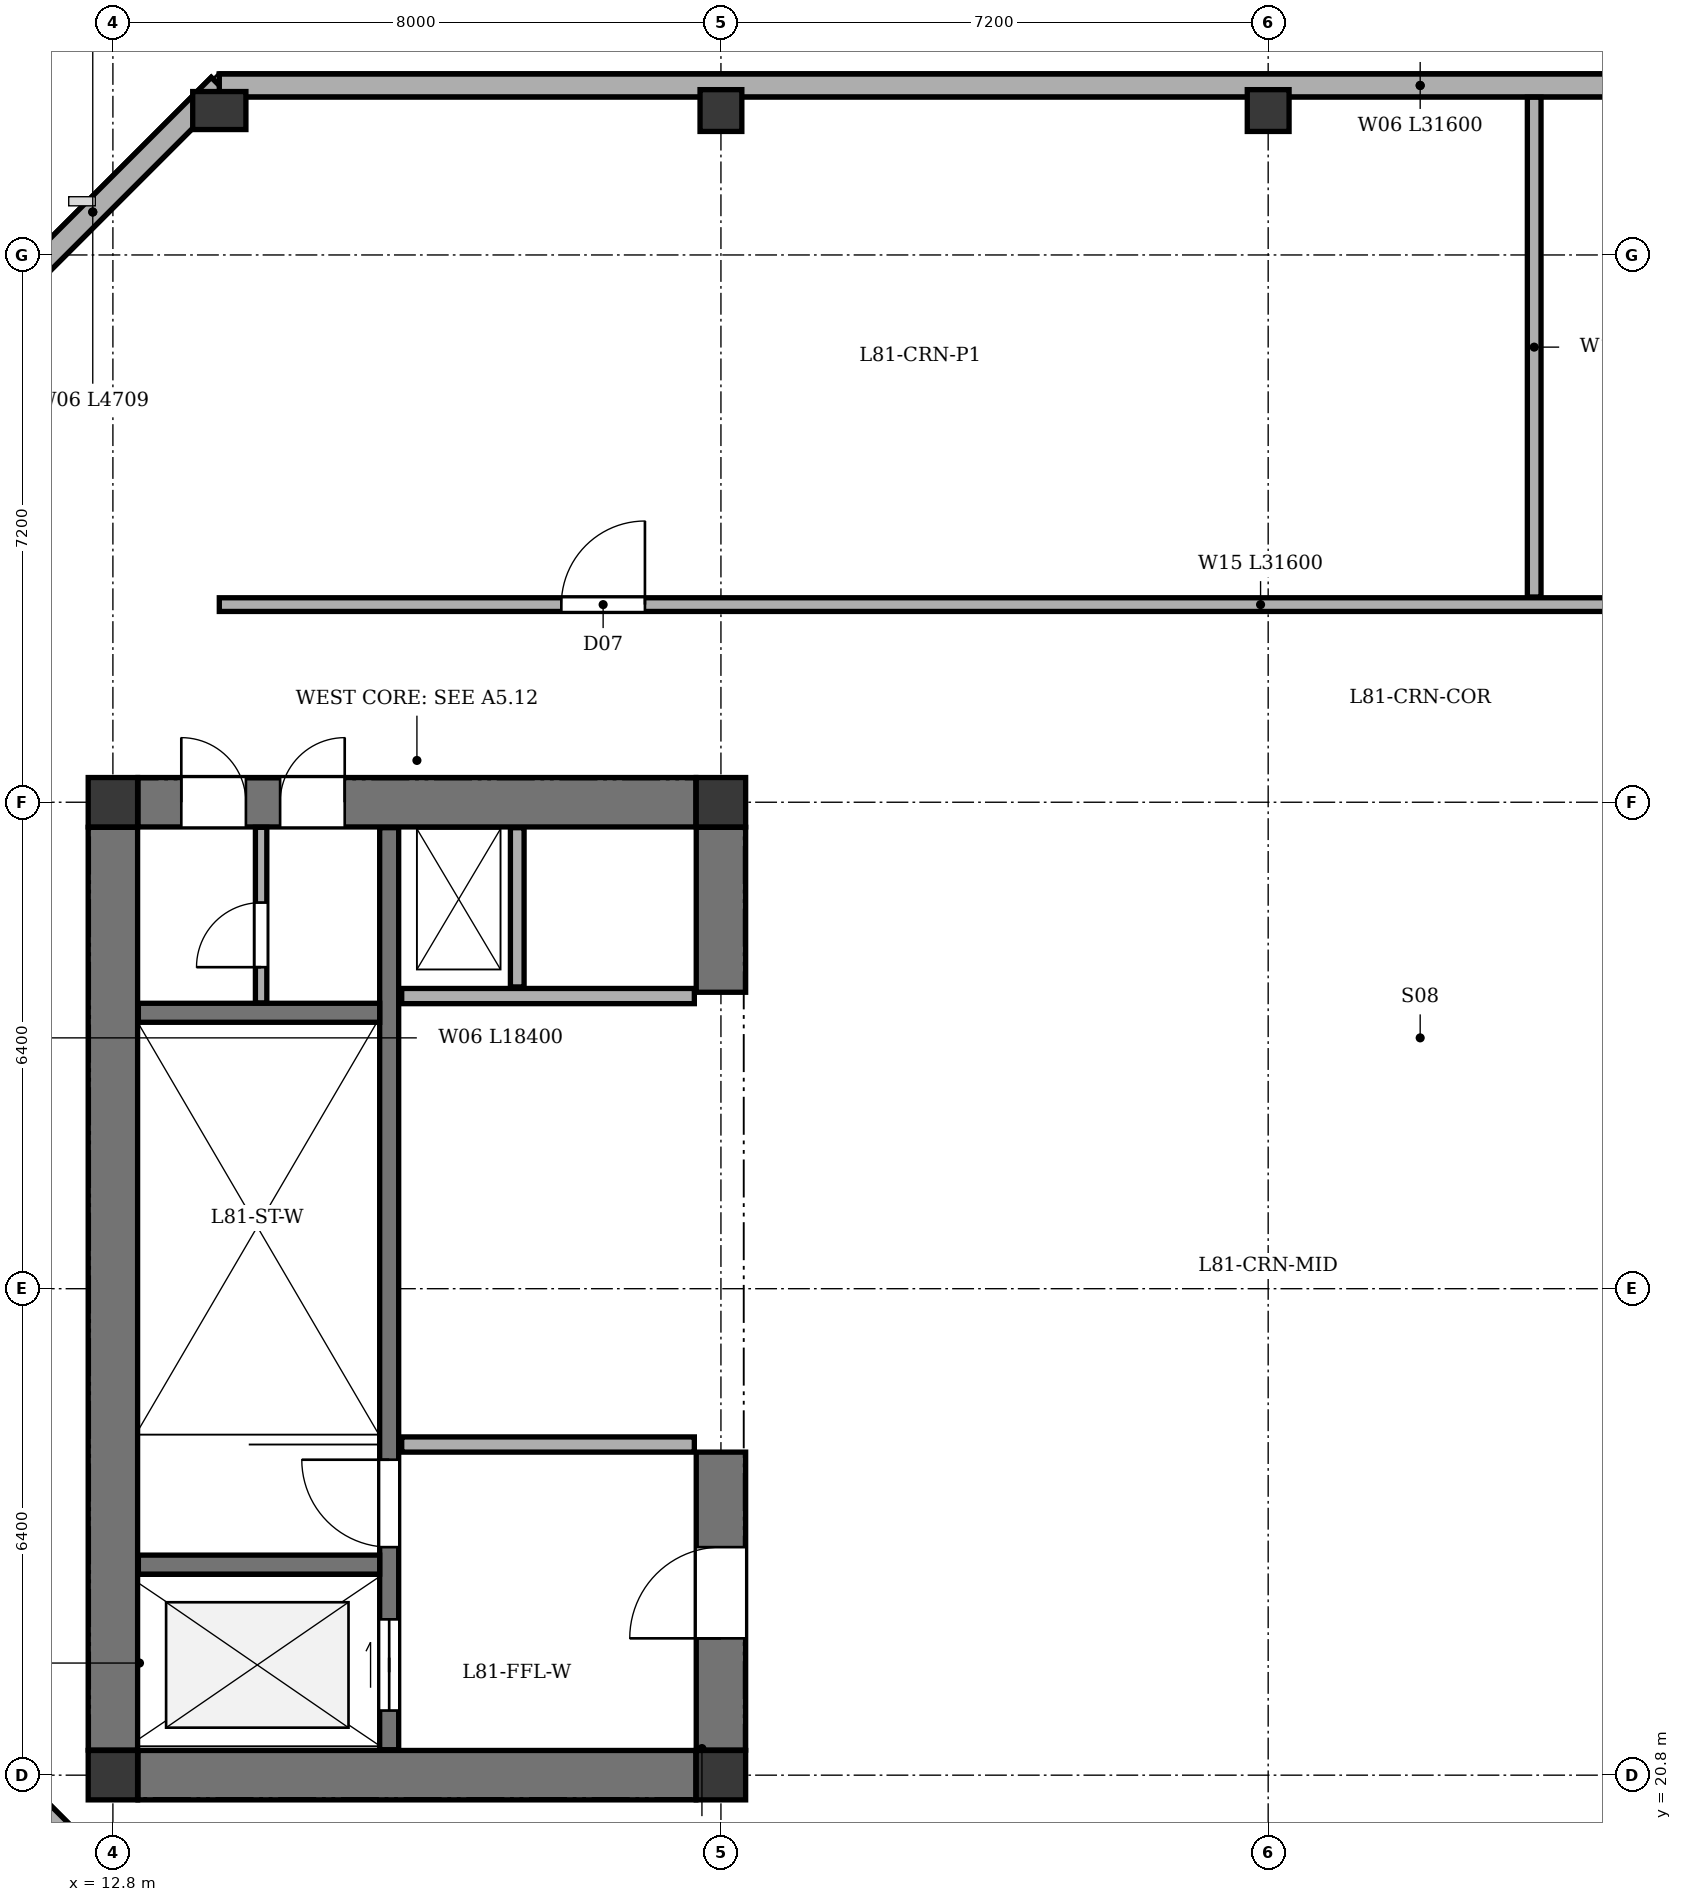
"""IFC4 building model, lengths in metres.
Left out: names, types, materials, properties, quantities, classifications, styles, units other than length and angle.
Written with IfcOpenShell. Run it as: python <this file> out.ifc"""

import sys

from ifc_helpers import new_model, si_unit, direction, frame, frame_2d, origin, origin_2d, place, context, subcontext, project, spatial, polyline, rectangle, outline, extrude, element, fill, save


model = new_model("IFC4")
c1 = context("Model", 3, precision=1e-05, world=origin(), true_north=direction((0.0, 1.0)))
c2 = subcontext(c1, "Body", "Model", "MODEL_VIEW")
j1 = project(units=[si_unit("LENGTHUNIT", "METRE"), si_unit("PLANEANGLEUNIT", "RADIAN")], contexts=[c1])
p1 = place(None, origin())
s1 = spatial("IfcSite", under=j1, at=p1, CompositionType="ELEMENT")
p2 = place(p1, origin())
s2 = spatial("IfcBuilding", under=s1, at=p2, CompositionType="ELEMENT")
p3 = place(p2, frame((0.0, 0.0, 309.0)))
s3 = spatial("IfcBuildingStorey", under=s2, at=p3, CompositionType="ELEMENT", Elevation=309.0)
for number, where, z_axis, x_axis in (
    (1, (12.8, 20.8, 0.0), (0.0, 0.0, 1.0), (1.0, 0.0, 0.0)),
    (2, (20.8, 20.8, 0.0), (0.0, 0.0, 1.0), (1.0, 0.0, 0.0)),
    (3, (12.8, 33.6, 0.0), (0.0, 0.0, 1.0), (1.0, 0.0, 0.0)),
    (4, (20.8, 33.6, 0.0), (0.0, 0.0, 1.0), (1.0, 0.0, 0.0)),
):
    element("IfcColumn", number, at=place(p3, frame(where, z_axis=z_axis, x_axis=x_axis)), inside=s3, PredefinedType="COLUMN", context=c2, shape_type="SweptSolid", body=[
        extrude(rectangle(XDim=0.65, YDim=0.65, at=origin_2d()), origin(), (0.0, 0.0, 1.0), 4.2),
    ])
p4 = place(p3, frame((14.2, 42.7, 0.0), z_axis=(0.0, 0.0, 1.0), x_axis=(1.0, 0.0, 0.0)))
e5 = element("IfcColumn", 5, at=p4, inside=s3, PredefinedType="COLUMN", context=c2, shape_type="SweptSolid", body=[
    extrude(rectangle(XDim=0.5, YDim=0.7, at=origin_2d()), origin(), (0.0, 0.0, 1.0), 4.2),
])
for number, where, z_axis, x_axis in (
    (6, (20.8, 42.7, 0.0), (0.0, 0.0, 1.0), (1.0, 0.0, 0.0)),
    (7, (28.0, 42.7, 0.0), (0.0, 0.0, 1.0), (1.0, 0.0, 0.0)),
):
    element("IfcColumn", number, at=place(p3, frame(where, z_axis=z_axis, x_axis=x_axis)), inside=s3, PredefinedType="COLUMN", context=c2, shape_type="SweptSolid", body=[
        extrude(rectangle(XDim=0.55, YDim=0.55, at=origin_2d()), origin(), (0.0, 0.0, 1.0), 4.2),
    ])
for number, where, z_axis, x_axis in (
    (8, (14.2, 17.97, 0.0), (0.0, 0.0, 1.0), (-0.707, 0.707, 0.0)),
    (9, (10.87, 39.7, 0.0), (0.0, 0.0, 1.0), (0.707, 0.707, 0.0)),
):
    element("IfcWall", number, at=place(p3, frame(where, z_axis=z_axis, x_axis=x_axis)), inside=s3, PredefinedType="STANDARD", context=c2, shape_type="SweptSolid", body=[
        extrude(rectangle(XDim=4.709, YDim=0.3, at=frame_2d((2.354, 0.0))), origin(), (0.0, 0.0, 1.0), 3.98),
    ])
p5 = place(p3, frame((14.2, 43.03, 0.0), z_axis=(0.0, 0.0, 1.0), x_axis=(1.0, 0.0, 0.0)))
e10 = element("IfcWall", 10, at=p5, inside=s3, PredefinedType="STANDARD", context=c2, shape_type="SweptSolid", body=[
    extrude(rectangle(XDim=31.6, YDim=0.3, at=frame_2d((15.8, 0.0))), origin(), (0.0, 0.0, 1.0), 3.98),
])
p6 = place(p3, frame((14.2, 17.97, 3.98), z_axis=(0.0, 0.0, 1.0), x_axis=(-0.707080859425, 0.707132701998, 0.0)))
e11 = element("IfcWall", 11, at=p6, inside=s3, PredefinedType="STANDARD", context=c2, shape_type="SweptSolid", body=[
    extrude(outline(polyline([(0.0, 0.0), (4.709, 0.0), (4.709, 0.346), (0.0, 1.238), (0.0, 0.0)])), frame((0.0, 0.15, 0.0), z_axis=(0.0, -1.0, 0.0), x_axis=(1.0, 0.0, 0.0)), (0.0, 0.0, 1.0), 0.3),
])
p7 = place(p3, frame((10.87, 39.7, 3.98), z_axis=(0.0, 0.0, 1.0), x_axis=(0.707080859425, 0.707132701998, 0.0)))
e12 = element("IfcWall", 12, at=p7, inside=s3, PredefinedType="STANDARD", context=c2, shape_type="SweptSolid", body=[
    extrude(outline(polyline([(0.0, 0.0), (4.709, 0.0), (4.709, 1.238), (0.0, 0.346), (0.0, 0.0)])), frame((0.0, 0.15, 0.0), z_axis=(0.0, -1.0, 0.0), x_axis=(1.0, 0.0, 0.0)), (0.0, 0.0, 1.0), 0.3),
])
p8 = place(p3, frame((14.2, 43.03, 3.98), z_axis=(0.0, 0.0, 1.0), x_axis=(1.0, 0.0, 0.0)))
e13 = element("IfcWall", 13, at=p8, inside=s3, PredefinedType="STANDARD", context=c2, shape_type="SweptSolid", body=[
    extrude(outline(polyline([(0.0, 0.0), (31.6, 0.0), (31.6, 9.705), (0.0, 1.238), (0.0, 0.0)])), frame((0.0, 0.15, 0.0), z_axis=(0.0, -1.0, 0.0), x_axis=(1.0, 0.0, 0.0)), (0.0, 0.0, 1.0), 0.3),
])
p9 = place(p3, frame((12.8, 21.13, 0.0), z_axis=(0.0, 0.0, 1.0), x_axis=(0.0, 1.0, 0.0)))
e14 = element("IfcWall", 14, at=p9, inside=s3, PredefinedType="SHEAR", context=c2, shape_type="SweptSolid", body=[
    extrude(rectangle(XDim=12.14, YDim=0.65, at=frame_2d((6.07, 0.0))), origin(), (0.0, 0.0, 1.0), 4.28),
])
p10 = place(p3, frame((13.13, 20.8, 0.0), z_axis=(0.0, 0.0, 1.0), x_axis=(1.0, 0.0, 0.0)))
e15 = element("IfcWall", 15, at=p10, inside=s3, PredefinedType="SHEAR", context=c2, shape_type="SweptSolid", body=[
    extrude(rectangle(XDim=7.34, YDim=0.65, at=frame_2d((3.67, 0.0))), origin(), (0.0, 0.0, 1.0), 4.28),
])
p11 = place(p3, frame((13.13, 33.6, 0.0), z_axis=(0.0, 0.0, 1.0), x_axis=(1.0, 0.0, 0.0)))
e16 = element("IfcWall", 16, at=p11, inside=s3, PredefinedType="SHEAR", context=c2, shape_type="SweptSolid", body=[
    extrude(rectangle(XDim=7.34, YDim=0.65, at=frame_2d((3.67, 0.0))), origin(), (0.0, 0.0, 1.0), 4.28),
])
p12 = place(p11, frame((0.57, 0.0, 0.0)))
e17 = element("IfcOpeningElement", 17, at=p12, cuts=e16, PredefinedType="OPENING", context=c2, shape_type="SweptSolid", body=[
    extrude(rectangle(XDim=0.85, YDim=2.02, at=frame_2d((0.425, 1.01))), frame((0.0, 0.335, 0.0), z_axis=(0.0, -1.0, 0.0), x_axis=(1.0, 0.0, 0.0)), (0.0, 0.0, 1.0), 0.67),
])
p13 = place(p11, frame((1.87, 0.0, 0.0)))
e18 = element("IfcOpeningElement", 18, at=p13, cuts=e16, PredefinedType="OPENING", context=c2, shape_type="SweptSolid", body=[
    extrude(rectangle(XDim=0.85, YDim=2.02, at=frame_2d((0.425, 1.01))), frame((0.0, 0.335, 0.0), z_axis=(0.0, -1.0, 0.0), x_axis=(1.0, 0.0, 0.0)), (0.0, 0.0, 1.0), 0.67),
])
p14 = place(p3, frame((20.8, 21.13, 0.0), z_axis=(0.0, 0.0, 1.0), x_axis=(0.0, 1.0, 0.0)))
e19 = element("IfcWall", 19, at=p14, inside=s3, PredefinedType="SHEAR", context=c2, shape_type="SweptSolid", body=[
    extrude(rectangle(XDim=3.92, YDim=0.65, at=frame_2d((1.96, 0.0))), origin(), (0.0, 0.0, 1.0), 4.28),
])
p15 = place(p14, frame((1.47, 0.0, 0.0)))
e20 = element("IfcOpeningElement", 20, at=p15, cuts=e19, PredefinedType="OPENING", context=c2, shape_type="SweptSolid", body=[
    extrude(rectangle(XDim=1.2, YDim=2.15, at=frame_2d((0.6, 1.075))), frame((0.0, 0.335, 0.0), z_axis=(0.0, -1.0, 0.0), x_axis=(1.0, 0.0, 0.0)), (0.0, 0.0, 1.0), 0.67),
])
p16 = place(p3, frame((20.8, 31.1, 0.0), z_axis=(0.0, 0.0, 1.0), x_axis=(0.0, 1.0, 0.0)))
e21 = element("IfcWall", 21, at=p16, inside=s3, PredefinedType="SHEAR", context=c2, shape_type="SweptSolid", body=[
    extrude(rectangle(XDim=2.17, YDim=0.65, at=frame_2d((1.085, 0.0))), origin(), (0.0, 0.0, 1.0), 4.28),
])
p17 = place(p3, frame((16.435, 21.135, 0.0), z_axis=(0.0, 0.0, 1.0), x_axis=(0.0, 1.0, 0.0)))
e22 = element("IfcWall", 22, at=p17, inside=s3, PredefinedType="SHEAR", context=c2, shape_type="SweptSolid", body=[
    extrude(rectangle(XDim=12.13, YDim=0.25, at=frame_2d((6.065, 0.0))), origin(), (0.0, 0.0, 1.0), 4.28),
])
p18 = place(p17, frame((0.515, 0.0, 0.0)))
e23 = element("IfcOpeningElement", 23, at=p18, cuts=e22, PredefinedType="OPENING", context=c2, shape_type="SweptSolid", body=[
    extrude(rectangle(XDim=1.2, YDim=2.15, at=frame_2d((0.6, 1.075))), frame((0.0, 0.135, 0.0), z_axis=(0.0, -1.0, 0.0), x_axis=(1.0, 0.0, 0.0)), (0.0, 0.0, 1.0), 0.27),
])
p19 = place(p17, frame((2.665, 0.0, 0.0)))
e24 = element("IfcOpeningElement", 24, at=p19, cuts=e22, PredefinedType="OPENING", context=c2, shape_type="SweptSolid", body=[
    extrude(rectangle(XDim=1.15, YDim=2.15, at=frame_2d((0.575, 1.075))), frame((0.0, 0.135, 0.0), z_axis=(0.0, -1.0, 0.0), x_axis=(1.0, 0.0, 0.0)), (0.0, 0.0, 1.0), 0.27),
])
for number, where, z_axis, x_axis in (
    (25, (13.135, 23.57, 0.0), (0.0, 0.0, 1.0), (1.0, 0.0, 0.0)),
    (26, (13.135, 30.83, 0.0), (0.0, 0.0, 1.0), (1.0, 0.0, 0.0)),
):
    element("IfcWall", number, at=place(p3, frame(where, z_axis=z_axis, x_axis=x_axis)), inside=s3, PredefinedType="SHEAR", context=c2, shape_type="SweptSolid", body=[
        extrude(rectangle(XDim=3.175, YDim=0.25, at=frame_2d((1.587, 0.0))), origin(), (0.0, 0.0, 1.0), 4.28),
    ])
for number, where, z_axis, x_axis in (
    (27, (16.6, 25.15, 0.0), (0.0, 0.0, 1.0), (1.0, 0.0, 0.0)),
    (28, (16.6, 31.05, 0.0), (0.0, 0.0, 1.0), (1.0, 0.0, 0.0)),
):
    element("IfcWall", number, at=place(p3, frame(where, z_axis=z_axis, x_axis=x_axis)), inside=s3, PredefinedType="SOLIDWALL", context=c2, shape_type="SweptSolid", body=[
        extrude(rectangle(XDim=3.85, YDim=0.2, at=frame_2d((1.925, 0.0))), origin(), (0.0, 0.0, 1.0), 4.28),
    ])
p20 = place(p3, frame((18.12, 31.17, 0.0), z_axis=(0.0, 0.0, 1.0), x_axis=(0.0, 1.0, 0.0)))
e29 = element("IfcWall", 29, at=p20, inside=s3, PredefinedType="PARTITIONING", context=c2, shape_type="SweptSolid", body=[
    extrude(rectangle(XDim=2.095, YDim=0.18, at=frame_2d((1.047, 0.0))), origin(), (0.0, 0.0, 1.0), 4.28),
])
p21 = place(p3, frame((14.75, 30.96, 0.0), z_axis=(0.0, 0.0, 1.0), x_axis=(0.0, 1.0, 0.0)))
e30 = element("IfcWall", 30, at=p21, inside=s3, PredefinedType="PARTITIONING", context=c2, shape_type="SweptSolid", body=[
    extrude(rectangle(XDim=2.31, YDim=0.15, at=frame_2d((1.155, 0.0))), origin(), (0.0, 0.0, 1.0), 3.88),
])
p22 = place(p21, frame((0.47, 0.0, 0.0)))
e31 = element("IfcOpeningElement", 31, at=p22, cuts=e30, PredefinedType="OPENING", context=c2, shape_type="SweptSolid", body=[
    extrude(rectangle(XDim=0.85, YDim=2.02, at=frame_2d((0.425, 1.01))), frame((0.0, 0.085, 0.0), z_axis=(0.0, -1.0, 0.0), x_axis=(1.0, 0.0, 0.0)), (0.0, 0.0, 1.0), 0.17),
])
p23 = place(p3, frame((14.2, 36.2, 0.0), z_axis=(0.0, 0.0, 1.0), x_axis=(1.0, 0.0, 0.0)))
e32 = element("IfcWall", 32, at=p23, inside=s3, PredefinedType="PARTITIONING", context=c2, shape_type="SweptSolid", body=[
    extrude(rectangle(XDim=31.6, YDim=0.18, at=frame_2d((15.8, 0.0))), origin(), (0.0, 0.0, 1.0), 3.88),
])
p24 = place(p23, frame((4.5, 0.0, 0.0)))
e33 = element("IfcOpeningElement", 33, at=p24, cuts=e32, PredefinedType="OPENING", context=c2, shape_type="SweptSolid", body=[
    extrude(rectangle(XDim=1.1, YDim=2.15, at=frame_2d((0.55, 1.075))), frame((0.0, 0.1, 0.0), z_axis=(0.0, -1.0, 0.0), x_axis=(1.0, 0.0, 0.0)), (0.0, 0.0, 1.0), 0.2),
])
p25 = place(p23, frame((21.8, 0.0, 0.0)))
e34 = element("IfcOpeningElement", 34, at=p25, cuts=e32, PredefinedType="OPENING", context=c2, shape_type="SweptSolid", body=[
    extrude(rectangle(XDim=1.1, YDim=2.15, at=frame_2d((0.55, 1.075))), frame((0.0, 0.1, 0.0), z_axis=(0.0, -1.0, 0.0), x_axis=(1.0, 0.0, 0.0)), (0.0, 0.0, 1.0), 0.2),
])
p26 = place(p3, frame((31.5, 36.3, 0.0), z_axis=(0.0, 0.0, 1.0), x_axis=(0.0, 1.0, 0.0)))
e35 = element("IfcWall", 35, at=p26, inside=s3, PredefinedType="PARTITIONING", context=c2, shape_type="SweptSolid", body=[
    extrude(rectangle(XDim=6.575, YDim=0.18, at=frame_2d((3.288, 0.0))), origin(), (0.0, 0.0, 1.0), 3.88),
])
p27 = place(p12, origin())
e36 = element("IfcDoor", 36, at=p27, inside=s3, OperationType="SINGLE_SWING_LEFT", PredefinedType="DOOR", context=c2, shape_type="SweptSolid", body=[
    extrude(rectangle(XDim=0.85, YDim=2.02, at=frame_2d((0.425, 1.01))), frame((0.0, 0.025, 0.0), z_axis=(0.0, -1.0, 0.0), x_axis=(1.0, 0.0, 0.0)), (0.0, 0.0, 1.0), 0.05),
])
fill(e17, e36)
p28 = place(p13, origin())
e37 = element("IfcDoor", 37, at=p28, inside=s3, OperationType="SINGLE_SWING_RIGHT", PredefinedType="DOOR", context=c2, shape_type="SweptSolid", body=[
    extrude(rectangle(XDim=0.85, YDim=2.02, at=frame_2d((0.425, 1.01))), frame((0.0, 0.025, 0.0), z_axis=(0.0, -1.0, 0.0), x_axis=(1.0, 0.0, 0.0)), (0.0, 0.0, 1.0), 0.05),
])
fill(e18, e37)
p29 = place(p15, origin())
e38 = element("IfcDoor", 38, at=p29, inside=s3, OperationType="SINGLE_SWING_LEFT", PredefinedType="DOOR", context=c2, shape_type="SweptSolid", body=[
    extrude(rectangle(XDim=1.2, YDim=2.15, at=frame_2d((0.6, 1.075))), frame((0.0, 0.025, 0.0), z_axis=(0.0, -1.0, 0.0), x_axis=(1.0, 0.0, 0.0)), (0.0, 0.0, 1.0), 0.05),
])
fill(e20, e38)
p30 = place(p18, origin())
e39 = element("IfcDoor", 39, at=p30, inside=s3, OperationType="DOUBLE_DOOR_SLIDING", PredefinedType="DOOR", context=c2, shape_type="SweptSolid", body=[
    extrude(rectangle(XDim=1.2, YDim=2.15, at=frame_2d((0.6, 1.075))), frame((0.0, 0.025, 0.0), z_axis=(0.0, -1.0, 0.0), x_axis=(1.0, 0.0, 0.0)), (0.0, 0.0, 1.0), 0.05),
])
fill(e23, e39)
p31 = place(p19, origin())
e40 = element("IfcDoor", 40, at=p31, inside=s3, OperationType="SINGLE_SWING_RIGHT", PredefinedType="DOOR", context=c2, shape_type="SweptSolid", body=[
    extrude(rectangle(XDim=1.15, YDim=2.15, at=frame_2d((0.575, 1.075))), frame((0.0, 0.025, 0.0), z_axis=(0.0, -1.0, 0.0), x_axis=(1.0, 0.0, 0.0)), (0.0, 0.0, 1.0), 0.05),
])
fill(e24, e40)
p32 = place(p22, origin())
e41 = element("IfcDoor", 41, at=p32, inside=s3, OperationType="SINGLE_SWING_LEFT", PredefinedType="DOOR", context=c2, shape_type="SweptSolid", body=[
    extrude(rectangle(XDim=0.85, YDim=2.02, at=frame_2d((0.425, 1.01))), frame((0.0, 0.025, 0.0), z_axis=(0.0, -1.0, 0.0), x_axis=(1.0, 0.0, 0.0)), (0.0, 0.0, 1.0), 0.05),
])
fill(e31, e41)
p33 = place(p24, origin())
e42 = element("IfcDoor", 42, at=p33, inside=s3, OperationType="SINGLE_SWING_RIGHT", PredefinedType="DOOR", context=c2, shape_type="SweptSolid", body=[
    extrude(rectangle(XDim=1.1, YDim=2.15, at=frame_2d((0.55, 1.075))), frame((0.0, 0.025, 0.0), z_axis=(0.0, -1.0, 0.0), x_axis=(1.0, 0.0, 0.0)), (0.0, 0.0, 1.0), 0.05),
])
fill(e33, e42)
save(model, sys.argv[1])
